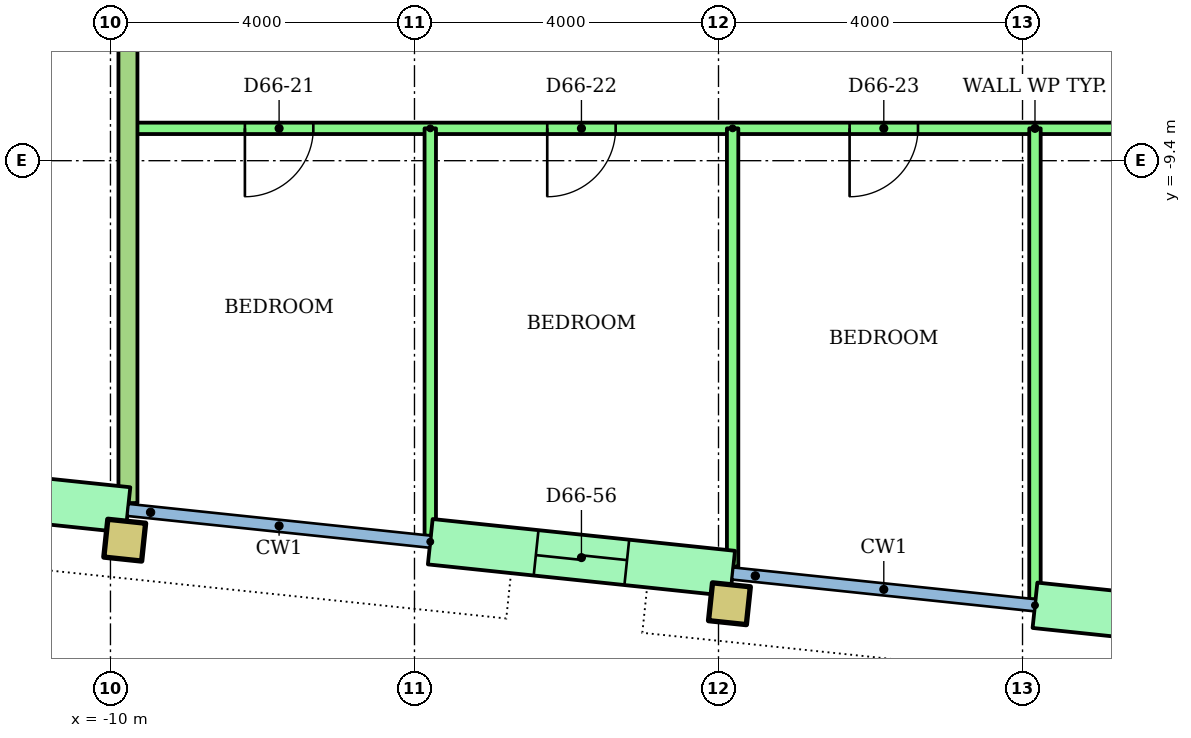
"""IFC4 building model, lengths in metres.
Left out: names, types, materials, properties, quantities, classifications, styles, units other than length and angle.
Written with IfcOpenShell. Run it as: python <this file> out.ifc"""

import sys

from ifc_helpers import new_model, si_unit, direction, frame, frame_2d, origin, origin_2d, place, context, subcontext, project, spatial, rectangle, hollow_rectangle, extrude, element, fill, save


model = new_model("IFC4")
c1 = context("Model", 3, precision=1e-05, world=origin(), true_north=direction((0.0, 1.0)))
c2 = subcontext(c1, "Body", "Model", "MODEL_VIEW")
j1 = project(units=[si_unit("LENGTHUNIT", "METRE"), si_unit("PLANEANGLEUNIT", "RADIAN")], contexts=[c1])
p1 = place(None, origin())
s1 = spatial("IfcSite", under=j1, at=p1, CompositionType="ELEMENT")
p2 = place(p1, origin())
s2 = spatial("IfcBuilding", under=s1, at=p2, CompositionType="ELEMENT")
p3 = place(p2, frame((0.0, 0.0, 256.3)))
s3 = spatial("IfcBuildingStorey", under=s2, at=p3, CompositionType="ELEMENT", Elevation=256.3)
for number, where, z_axis, x_axis in (
    (1, (-9.812, -14.392, 0.0), (0.0, 0.0, 1.0), (0.995, -0.105, 0.0)),
    (2, (-1.856, -15.229, 0.0), (0.0, 0.0, 1.0), (0.995, -0.105, 0.0)),
):
    element("IfcColumn", number, at=place(p3, frame(where, z_axis=z_axis, x_axis=x_axis)), inside=s3, PredefinedType="COLUMN", context=c2, shape_type="SweptSolid", body=[
        extrude(hollow_rectangle(XDim=0.5, YDim=0.5, WallThickness=0.025, at=origin_2d()), origin(), (0.0, 0.0, 1.0), 3.2),
    ])
p4 = place(p3, frame((-13.749, -13.576, 0.0), z_axis=(0.0, 0.0, 1.0), x_axis=(0.994519156568, -0.104554517933, 0.0)))
e3 = element("IfcWall", 3, at=p4, inside=s3, PredefinedType="STANDARD", context=c2, shape_type="SweptSolid", body=[
    extrude(rectangle(XDim=4.0, YDim=0.6, at=frame_2d((2.0, 0.0))), origin(), (0.0, 0.0, 1.0), 2.92),
])
p5 = place(p4, frame((1.4, 0.0, 0.0)))
e4 = element("IfcOpeningElement", 4, at=p5, cuts=e3, PredefinedType="OPENING", context=c2, shape_type="SweptSolid", body=[
    extrude(rectangle(XDim=1.2, YDim=2.1, at=frame_2d((0.6, 1.05))), frame((0.0, 0.31, 0.0), z_axis=(0.0, -1.0, 0.0), x_axis=(1.0, 0.0, 0.0)), (0.0, 0.0, 1.0), 0.62),
])
p6 = place(p3, frame((-5.792, -14.413, 0.0), z_axis=(0.0, 0.0, 1.0), x_axis=(0.99452550138, -0.104494148666, 0.0)))
e5 = element("IfcWall", 5, at=p6, inside=s3, PredefinedType="STANDARD", context=c2, shape_type="SweptSolid", body=[
    extrude(rectangle(XDim=4.0, YDim=0.6, at=frame_2d((2.0, 0.0))), origin(), (0.0, 0.0, 1.0), 2.92),
])
p7 = place(p6, frame((1.4, 0.0, 0.0)))
e6 = element("IfcOpeningElement", 6, at=p7, cuts=e5, PredefinedType="OPENING", context=c2, shape_type="SweptSolid", body=[
    extrude(rectangle(XDim=1.2, YDim=2.1, at=frame_2d((0.6, 1.05))), frame((0.0, 0.31, 0.0), z_axis=(0.0, -1.0, 0.0), x_axis=(1.0, 0.0, 0.0)), (0.0, 0.0, 1.0), 0.62),
])
p8 = place(p3, frame((2.164, -15.249, 0.0), z_axis=(0.0, 0.0, 1.0), x_axis=(0.99452550138, -0.104494148666, 0.0)))
e7 = element("IfcWall", 7, at=p8, inside=s3, PredefinedType="STANDARD", context=c2, shape_type="SweptSolid", body=[
    extrude(rectangle(XDim=4.0, YDim=0.6, at=frame_2d((2.0, 0.0))), origin(), (0.0, 0.0, 1.0), 2.92),
])
p9 = place(p8, frame((1.4, 0.0, 0.0)))
e8 = element("IfcOpeningElement", 8, at=p9, cuts=e7, PredefinedType="OPENING", context=c2, shape_type="SweptSolid", body=[
    extrude(rectangle(XDim=1.2, YDim=2.1, at=frame_2d((0.6, 1.05))), frame((0.0, 0.31, 0.0), z_axis=(0.0, -1.0, 0.0), x_axis=(1.0, 0.0, 0.0)), (0.0, 0.0, 1.0), 0.62),
])
p10 = place(p3, frame((14.098, -8.975, 0.0), z_axis=(0.0, 0.0, 1.0), x_axis=(-1.0, 0.0, 0.0)))
e9 = element("IfcWall", 9, at=p10, inside=s3, PredefinedType="PARTITIONING", context=c2, shape_type="SweptSolid", body=[
    extrude(rectangle(XDim=23.868, YDim=0.15, at=frame_2d((11.934, 0.0))), origin(), (0.0, 0.0, 1.0), 2.4),
])
p11 = place(p10, frame((21.429, 0.0, 0.0)))
e10 = element("IfcOpeningElement", 10, at=p11, cuts=e9, PredefinedType="OPENING", context=c2, shape_type="SweptSolid", body=[
    extrude(rectangle(XDim=0.9, YDim=2.1, at=frame_2d((0.45, 1.05))), frame((0.0, 0.085, 0.0), z_axis=(0.0, -1.0, 0.0), x_axis=(1.0, 0.0, 0.0)), (0.0, 0.0, 1.0), 0.17),
])
p12 = place(p10, frame((17.451, 0.0, 0.0)))
e11 = element("IfcOpeningElement", 11, at=p12, cuts=e9, PredefinedType="OPENING", context=c2, shape_type="SweptSolid", body=[
    extrude(rectangle(XDim=0.9, YDim=2.1, at=frame_2d((0.45, 1.05))), frame((0.0, 0.085, 0.0), z_axis=(0.0, -1.0, 0.0), x_axis=(1.0, 0.0, 0.0)), (0.0, 0.0, 1.0), 0.17),
])
p13 = place(p10, frame((13.473, 0.0, 0.0)))
e12 = element("IfcOpeningElement", 12, at=p13, cuts=e9, PredefinedType="OPENING", context=c2, shape_type="SweptSolid", body=[
    extrude(rectangle(XDim=0.9, YDim=2.1, at=frame_2d((0.45, 1.05))), frame((0.0, 0.085, 0.0), z_axis=(0.0, -1.0, 0.0), x_axis=(1.0, 0.0, 0.0)), (0.0, 0.0, 1.0), 0.17),
])
p14 = place(p10, frame((9.495, 0.0, 0.0)))
e13 = element("IfcOpeningElement", 13, at=p14, cuts=e9, PredefinedType="OPENING", context=c2, shape_type="SweptSolid", body=[
    extrude(rectangle(XDim=0.9, YDim=2.1, at=frame_2d((0.45, 1.05))), frame((0.0, 0.085, 0.0), z_axis=(0.0, -1.0, 0.0), x_axis=(1.0, 0.0, 0.0)), (0.0, 0.0, 1.0), 0.17),
])
p15 = place(p10, frame((3.478, 0.0, 0.0)))
e14 = element("IfcOpeningElement", 14, at=p15, cuts=e9, PredefinedType="OPENING", context=c2, shape_type="SweptSolid", body=[
    extrude(rectangle(XDim=1.0, YDim=2.1, at=frame_2d((0.5, 1.05))), frame((0.0, 0.085, 0.0), z_axis=(0.0, -1.0, 0.0), x_axis=(1.0, 0.0, 0.0)), (0.0, 0.0, 1.0), 0.17),
])
p16 = place(p3, frame((-5.792, -8.975, 0.0), z_axis=(0.0, 0.0, 1.0), x_axis=(0.0, -1.0, 0.0)))
e15 = element("IfcWall", 15, at=p16, inside=s3, PredefinedType="PARTITIONING", context=c2, shape_type="SweptSolid", body=[
    extrude(rectangle(XDim=5.359, YDim=0.15, at=frame_2d((2.679, 0.0))), origin(), (0.0, 0.0, 1.0), 2.4),
])
p17 = place(p3, frame((-1.814, -8.975, 0.0), z_axis=(0.0, 0.0, 1.0), x_axis=(0.0, -1.0, 0.0)))
e16 = element("IfcWall", 16, at=p17, inside=s3, PredefinedType="PARTITIONING", context=c2, shape_type="SweptSolid", body=[
    extrude(rectangle(XDim=5.766, YDim=0.15, at=frame_2d((2.883, 0.0))), origin(), (0.0, 0.0, 1.0), 2.4),
])
p18 = place(p3, frame((2.164, -8.975, 0.0), z_axis=(0.0, 0.0, 1.0), x_axis=(0.0, -1.0, 0.0)))
e17 = element("IfcWall", 17, at=p18, inside=s3, PredefinedType="PARTITIONING", context=c2, shape_type="SweptSolid", body=[
    extrude(rectangle(XDim=6.195, YDim=0.15, at=frame_2d((3.097, 0.0))), origin(), (0.0, 0.0, 1.0), 2.4),
])
p19 = place(p3, frame((-9.77, -1.4, 0.0), z_axis=(0.0, 0.0, 1.0), x_axis=(0.0, -1.0, 0.0)))
e18 = element("IfcWall", 18, at=p19, inside=s3, PredefinedType="PARTITIONING", context=c2, shape_type="SweptSolid", body=[
    extrude(rectangle(XDim=12.504, YDim=0.25, at=frame_2d((6.252, 0.0))), origin(), (0.0, 0.0, 1.0), 2.4),
])
p20 = place(p11, origin())
e19 = element("IfcDoor", 19, at=p20, inside=s3, OperationType="SINGLE_SWING_RIGHT", PredefinedType="DOOR", context=c2, shape_type="SweptSolid", body=[
    extrude(rectangle(XDim=0.9, YDim=2.1, at=frame_2d((0.45, 1.05))), frame((0.0, 0.025, 0.0), z_axis=(0.0, -1.0, 0.0), x_axis=(1.0, 0.0, 0.0)), (0.0, 0.0, 1.0), 0.05),
])
fill(e10, e19)
p21 = place(p12, origin())
e20 = element("IfcDoor", 20, at=p21, inside=s3, OperationType="SINGLE_SWING_RIGHT", PredefinedType="DOOR", context=c2, shape_type="SweptSolid", body=[
    extrude(rectangle(XDim=0.9, YDim=2.1, at=frame_2d((0.45, 1.05))), frame((0.0, 0.025, 0.0), z_axis=(0.0, -1.0, 0.0), x_axis=(1.0, 0.0, 0.0)), (0.0, 0.0, 1.0), 0.05),
])
fill(e11, e20)
p22 = place(p13, origin())
e21 = element("IfcDoor", 21, at=p22, inside=s3, OperationType="SINGLE_SWING_RIGHT", PredefinedType="DOOR", context=c2, shape_type="SweptSolid", body=[
    extrude(rectangle(XDim=0.9, YDim=2.1, at=frame_2d((0.45, 1.05))), frame((0.0, 0.025, 0.0), z_axis=(0.0, -1.0, 0.0), x_axis=(1.0, 0.0, 0.0)), (0.0, 0.0, 1.0), 0.05),
])
fill(e12, e21)
p23 = place(p7, origin())
e22 = element("IfcDoor", 22, at=p23, inside=s3, OperationType="SLIDING_TO_LEFT", PredefinedType="DOOR", context=c2, shape_type="SweptSolid", body=[
    extrude(rectangle(XDim=1.2, YDim=2.1, at=frame_2d((0.6, 1.05))), frame((0.0, 0.025, 0.0), z_axis=(0.0, -1.0, 0.0), x_axis=(1.0, 0.0, 0.0)), (0.0, 0.0, 1.0), 0.05),
])
fill(e6, e22)
save(model, sys.argv[1])
